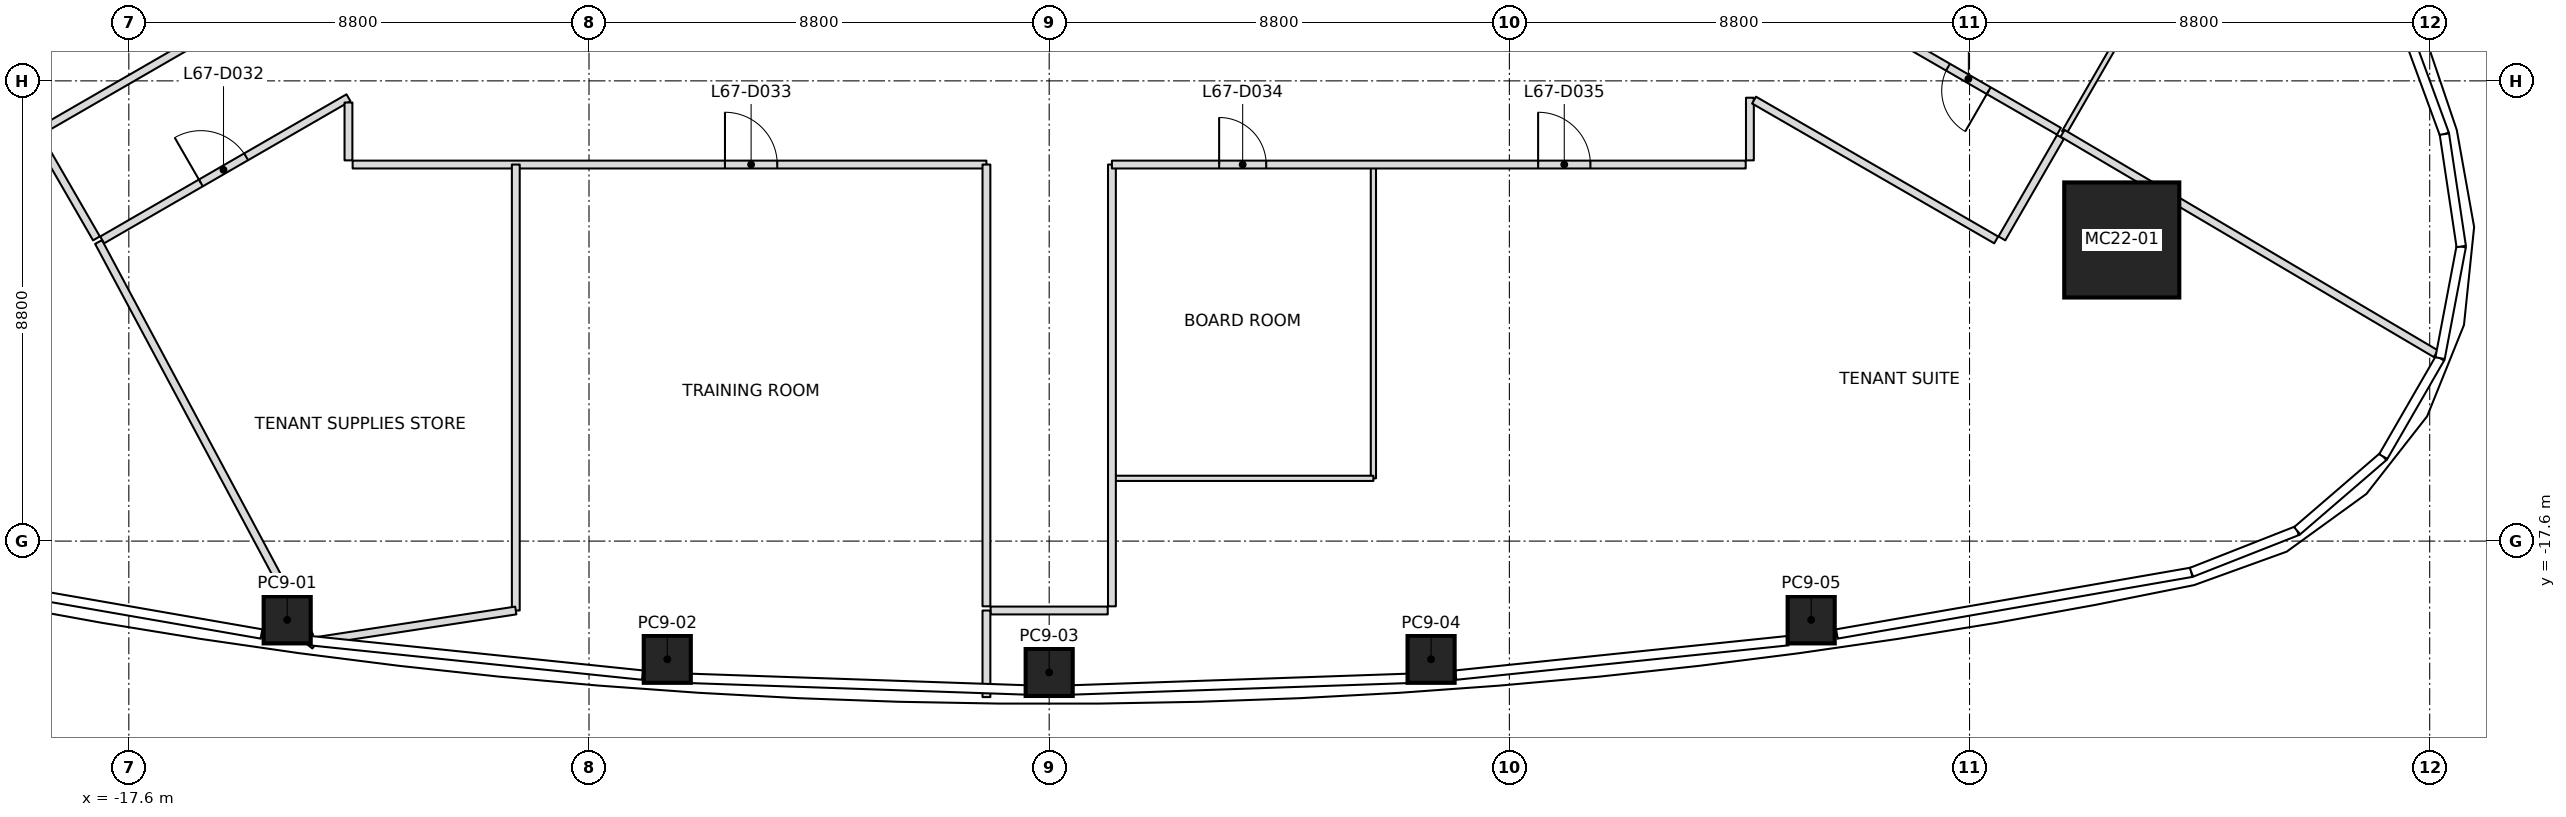
"""IFC4 building model, lengths in metres.
Left out: names, types, materials, properties, quantities, classifications, styles, units other than length and angle.
Written with IfcOpenShell. Run it as: python <this file> out.ifc"""

import sys

from ifc_helpers import new_model, si_unit, direction, frame, frame_2d, origin, origin_2d, place, context, subcontext, project, spatial, rectangle, extrude, element, fill, save


model = new_model("IFC4")
c1 = context("Model", 3, precision=1e-05, world=origin(), true_north=direction((0.0, 1.0)))
c2 = subcontext(c1, "Body", "Model", "MODEL_VIEW")
j1 = project(units=[si_unit("LENGTHUNIT", "METRE"), si_unit("PLANEANGLEUNIT", "RADIAN")], contexts=[c1])
p1 = place(None, origin())
s1 = spatial("IfcSite", under=j1, at=p1, CompositionType="ELEMENT")
p2 = place(p1, origin())
s2 = spatial("IfcBuilding", under=s1, at=p2, CompositionType="ELEMENT")
p3 = place(p2, frame((0.0, 0.0, 295.0)))
s3 = spatial("IfcBuildingStorey", under=s2, at=p3, CompositionType="ELEMENT", Elevation=295.0)
p4 = place(p3, frame((20.511, -11.842, 0.0), z_axis=(-0.027695790401, 0.015983033227, 0.999488612163), x_axis=(0.999616398022, 0.00044283261, 0.027692249912)))
e1 = element("IfcColumn", 1, at=p4, inside=s3, PredefinedType="COLUMN", context=c2, shape_type="SweptSolid", body=[
    extrude(rectangle(XDim=2.2, YDim=2.2, at=origin_2d()), origin(), (0.0, 0.0, 1.0), 4.002),
])
p5 = place(p3, frame((-14.572, -19.106, 0.0), z_axis=(0.017452456582, 0.010373837829, 0.999793876381), x_axis=(-0.990378020891, 0.137476485658, 0.015861640101)))
e2 = element("IfcColumn", 2, at=p5, inside=s3, PredefinedType="COLUMN", context=c2, shape_type="SweptSolid", body=[
    extrude(rectangle(XDim=0.9, YDim=0.9, at=origin_2d()), origin(), (0.0, 0.0, 1.0), 4.001),
])
p6 = place(p3, frame((-7.303, -19.86, 0.0), z_axis=(0.008727150594, 0.011168311599, 0.999899547784), x_axis=(-0.997591359103, 0.068909208886, 0.007937327827)))
e3 = element("IfcColumn", 3, at=p6, inside=s3, PredefinedType="COLUMN", context=c2, shape_type="SweptSolid", body=[
    extrude(rectangle(XDim=0.9, YDim=0.9, at=origin_2d()), origin(), (0.0, 0.0, 1.0), 4.0),
])
p7 = place(p3, frame((0.0, -20.111, 0.0), z_axis=(0.0, 0.01141283087, 0.999934871525), x_axis=(1.0, 0.0, 0.0)))
e4 = element("IfcColumn", 4, at=p7, inside=s3, PredefinedType="COLUMN", context=c2, shape_type="SweptSolid", body=[
    extrude(rectangle(XDim=0.9, YDim=0.9, at=origin_2d()), origin(), (0.0, 0.0, 1.0), 4.0),
])
p8 = place(p3, frame((7.303, -19.86, 0.0), z_axis=(-0.008727150594, 0.011168311599, 0.999899547784), x_axis=(0.997591359103, 0.068909208886, 0.007937327827)))
e5 = element("IfcColumn", 5, at=p8, inside=s3, PredefinedType="COLUMN", context=c2, shape_type="SweptSolid", body=[
    extrude(rectangle(XDim=0.9, YDim=0.9, at=origin_2d()), origin(), (0.0, 0.0, 1.0), 4.0),
])
p9 = place(p3, frame((14.572, -19.106, 0.0), z_axis=(-0.017452456582, 0.010373837829, 0.999793876381), x_axis=(0.990378020891, 0.137476485658, 0.015861640101)))
e6 = element("IfcColumn", 6, at=p9, inside=s3, PredefinedType="COLUMN", context=c2, shape_type="SweptSolid", body=[
    extrude(rectangle(XDim=0.9, YDim=0.9, at=origin_2d()), origin(), (0.0, 0.0, 1.0), 4.001),
])
p10 = place(p3, frame((-18.179, -11.881, 0.0), z_axis=(0.0, 0.0, 1.0), x_axis=(0.471890219443, -0.881657314831, 0.0)))
e7 = element("IfcWall", 7, at=p10, inside=s3, PredefinedType="PARTITIONING", context=c2, shape_type="SweptSolid", body=[
    extrude(rectangle(XDim=8.552, YDim=0.15, at=frame_2d((4.276, 0.0))), origin(), (0.0, 0.0, 1.0), 3.45),
])
p11 = place(p3, frame((-10.2, -10.4, 0.0), z_axis=(0.0, 0.0, 1.0), x_axis=(0.0, -1.0, 0.0)))
e8 = element("IfcWall", 8, at=p11, inside=s3, PredefinedType="PARTITIONING", context=c2, shape_type="SweptSolid", body=[
    extrude(rectangle(XDim=8.527, YDim=0.15, at=frame_2d((4.264, 0.0))), origin(), (0.0, 0.0, 1.0), 3.45),
])
p12 = place(p3, frame((-10.2, -18.927, 0.0), z_axis=(0.0, 0.0, 1.0), x_axis=(-0.988493450788, -0.151263669625, 0.0)))
e9 = element("IfcWall", 9, at=p12, inside=s3, PredefinedType="PARTITIONING", context=c2, shape_type="SweptSolid", body=[
    extrude(rectangle(XDim=3.838, YDim=0.15, at=frame_2d((1.919, 0.0))), origin(), (0.0, 0.0, 1.0), 3.234),
])
p13 = place(p3, frame((-14.044, -19.594, 0.0), z_axis=(0.0, 0.0, 1.0), x_axis=(-0.785084693937, 0.619388426875, 0.0)))
e10 = element("IfcWall", 10, at=p13, inside=s3, PredefinedType="PARTITIONING", context=c2, shape_type="SweptSolid", body=[
    extrude(rectangle(XDim=0.186, YDim=0.15, at=frame_2d((0.093, 0.0))), origin(), (0.0, 0.0, 1.0), 3.45),
])
p14 = place(p3, frame((-1.2, -18.927, 0.0), z_axis=(0.0, 0.0, 1.0), x_axis=(0.0, -1.0, 0.0)))
e11 = element("IfcWall", 11, at=p14, inside=s3, PredefinedType="PARTITIONING", context=c2, shape_type="SweptSolid", body=[
    extrude(rectangle(XDim=1.656, YDim=0.15, at=frame_2d((0.828, 0.0))), origin(), (0.0, 0.0, 1.0), 3.234),
])
p15 = place(p3, frame((19.379, -9.803, 0.0), z_axis=(0.0, 0.0, 1.0), x_axis=(0.861122287614, -0.508397881364, 0.0)))
e12 = element("IfcWall", 12, at=p15, inside=s3, PredefinedType="PARTITIONING", context=c2, shape_type="SweptSolid", body=[
    extrude(rectangle(XDim=8.29, YDim=0.15, at=frame_2d((4.145, 0.0))), origin(), (0.0, 0.0, 1.0), 3.234),
])
p16 = place(p3, frame((-19.339, -9.872, 0.0), z_axis=(0.0, 0.0, 1.0), x_axis=(0.500030632641, -0.866007717299, 0.0)))
e13 = element("IfcWall", 13, at=p16, inside=s3, PredefinedType="PARTITIONING", context=c2, shape_type="SweptSolid", body=[
    extrude(rectangle(XDim=2.24, YDim=0.15, at=frame_2d((1.12, 0.0))), origin(), (0.0, 0.0, 1.0), 3.233),
])
p17 = place(p3, frame((-13.4, -6.351, 0.0), z_axis=(0.0, 0.0, 1.0), x_axis=(-0.866024132967, -0.500002201113, 0.0)))
e14 = element("IfcWall", 14, at=p17, inside=s3, PredefinedType="PARTITIONING", context=c2, shape_type="SweptSolid", body=[
    extrude(rectangle(XDim=6.824, YDim=0.15, at=frame_2d((3.412, 0.0))), origin(), (0.0, 0.0, 1.0), 3.317),
])
p18 = place(p3, frame((-18.11, -11.841, 0.0), z_axis=(0.0, 0.0, 1.0), x_axis=(0.866030095999, 0.499991872758, 0.0)))
e15 = element("IfcWall", 15, at=p18, inside=s3, PredefinedType="PARTITIONING", context=c2, shape_type="SweptSolid", body=[
    extrude(rectangle(XDim=5.438, YDim=0.15, at=frame_2d((2.719, 0.0))), origin(), (0.0, 0.0, 1.0), 3.233),
])
p19 = place(p18, frame((2.179, 0.0, 0.0)))
e16 = element("IfcOpeningElement", 16, at=p19, cuts=e15, PredefinedType="OPENING", context=c2, shape_type="SweptSolid", body=[
    extrude(rectangle(XDim=1.0, YDim=2.1, at=frame_2d((0.5, 1.05))), frame((0.0, 0.075, 0.0), z_axis=(0.0, -1.0, 0.0), x_axis=(1.0, 0.0, 0.0)), (0.0, 0.0, 1.0), 0.15),
])
p20 = place(p3, frame((-13.4, -9.214, 0.0), z_axis=(0.0, 0.0, 1.0), x_axis=(0.0, -1.0, 0.0)))
e17 = element("IfcWall", 17, at=p20, inside=s3, PredefinedType="PARTITIONING", context=c2, shape_type="SweptSolid", body=[
    extrude(rectangle(XDim=1.106, YDim=0.15, at=frame_2d((0.553, 0.0))), origin(), (0.0, 0.0, 1.0), 3.233),
])
p21 = place(p3, frame((-13.32, -10.4, 0.0), z_axis=(0.0, 0.0, 1.0), x_axis=(1.0, 0.0, 0.0)))
e18 = element("IfcWall", 18, at=p21, inside=s3, PredefinedType="PARTITIONING", context=c2, shape_type="SweptSolid", body=[
    extrude(rectangle(XDim=12.12, YDim=0.15, at=frame_2d((6.06, 0.0))), origin(), (0.0, 0.0, 1.0), 3.393),
])
p22 = place(p21, frame((7.12, 0.0, 0.0)))
e19 = element("IfcOpeningElement", 19, at=p22, cuts=e18, PredefinedType="OPENING", context=c2, shape_type="SweptSolid", body=[
    extrude(rectangle(XDim=1.0, YDim=2.1, at=frame_2d((0.5, 1.05))), frame((0.0, 0.075, 0.0), z_axis=(0.0, -1.0, 0.0), x_axis=(1.0, 0.0, 0.0)), (0.0, 0.0, 1.0), 0.15),
])
p23 = place(p3, frame((-1.2, -10.4, 0.0), z_axis=(0.0, 0.0, 1.0), x_axis=(0.0, -1.0, 0.0)))
e20 = element("IfcWall", 20, at=p23, inside=s3, PredefinedType="PARTITIONING", context=c2, shape_type="SweptSolid", body=[
    extrude(rectangle(XDim=8.447, YDim=0.15, at=frame_2d((4.224, 0.0))), origin(), (0.0, 0.0, 1.0), 3.45),
])
p24 = place(p3, frame((-1.12, -18.927, 0.0), z_axis=(0.0, 0.0, 1.0), x_axis=(1.0, 0.0, 0.0)))
e21 = element("IfcWall", 21, at=p24, inside=s3, PredefinedType="PARTITIONING", context=c2, shape_type="SweptSolid", body=[
    extrude(rectangle(XDim=2.24, YDim=0.15, at=frame_2d((1.12, 0.0))), origin(), (0.0, 0.0, 1.0), 3.45),
])
p25 = place(p3, frame((1.2, -18.847, 0.0), z_axis=(0.0, 0.0, 1.0), x_axis=(0.0, 1.0, 0.0)))
e22 = element("IfcWall", 22, at=p25, inside=s3, PredefinedType="PARTITIONING", context=c2, shape_type="SweptSolid", body=[
    extrude(rectangle(XDim=8.447, YDim=0.15, at=frame_2d((4.224, 0.0))), origin(), (0.0, 0.0, 1.0), 3.45),
])
p26 = place(p3, frame((1.2, -10.4, 0.0), z_axis=(0.0, 0.0, 1.0), x_axis=(1.0, 0.0, 0.0)))
e23 = element("IfcWall", 23, at=p26, inside=s3, PredefinedType="PARTITIONING", context=c2, shape_type="SweptSolid", body=[
    extrude(rectangle(XDim=12.12, YDim=0.15, at=frame_2d((6.06, 0.0))), origin(), (0.0, 0.0, 1.0), 3.393),
])
p27 = place(p26, frame((2.05, 0.0, 0.0)))
e24 = element("IfcOpeningElement", 24, at=p27, cuts=e23, PredefinedType="OPENING", context=c2, shape_type="SweptSolid", body=[
    extrude(rectangle(XDim=0.9, YDim=2.1, at=frame_2d((0.45, 1.05))), frame((0.0, 0.075, 0.0), z_axis=(0.0, -1.0, 0.0), x_axis=(1.0, 0.0, 0.0)), (0.0, 0.0, 1.0), 0.15),
])
p28 = place(p26, frame((8.15, 0.0, 0.0)))
e25 = element("IfcOpeningElement", 25, at=p28, cuts=e23, PredefinedType="OPENING", context=c2, shape_type="SweptSolid", body=[
    extrude(rectangle(XDim=1.0, YDim=2.1, at=frame_2d((0.5, 1.05))), frame((0.0, 0.075, 0.0), z_axis=(0.0, -1.0, 0.0), x_axis=(1.0, 0.0, 0.0)), (0.0, 0.0, 1.0), 0.15),
])
p29 = place(p3, frame((13.4, -10.32, 0.0), z_axis=(0.0, 0.0, 1.0), x_axis=(0.0, 1.0, 0.0)))
e26 = element("IfcWall", 26, at=p29, inside=s3, PredefinedType="PARTITIONING", context=c2, shape_type="SweptSolid", body=[
    extrude(rectangle(XDim=1.198, YDim=0.15, at=frame_2d((0.599, 0.0))), origin(), (0.0, 0.0, 1.0), 3.233),
])
p30 = place(p3, frame((13.479, -9.168, 0.0), z_axis=(0.0, 0.0, 1.0), x_axis=(0.866037316941, -0.49997936524, 0.0)))
e27 = element("IfcWall", 27, at=p30, inside=s3, PredefinedType="PARTITIONING", context=c2, shape_type="SweptSolid", body=[
    extrude(rectangle(XDim=5.347, YDim=0.15, at=frame_2d((2.673, 0.0))), origin(), (0.0, 0.0, 1.0), 3.233),
])
p31 = place(p3, frame((19.31, -9.763, 0.0), z_axis=(0.0, 0.0, 1.0), x_axis=(-0.866024132967, 0.500002201113, 0.0)))
e28 = element("IfcWall", 28, at=p31, inside=s3, PredefinedType="PARTITIONING", context=c2, shape_type="SweptSolid", body=[
    extrude(rectangle(XDim=6.824, YDim=0.15, at=frame_2d((3.412, 0.0))), origin(), (0.0, 0.0, 1.0), 3.317),
])
p32 = place(p31, frame((1.55, 0.0, 0.0)))
e29 = element("IfcOpeningElement", 29, at=p32, cuts=e28, PredefinedType="OPENING", context=c2, shape_type="SweptSolid", body=[
    extrude(rectangle(XDim=0.9, YDim=2.1, at=frame_2d((0.45, 1.05))), frame((0.0, 0.075, 0.0), z_axis=(0.0, -1.0, 0.0), x_axis=(1.0, 0.0, 0.0)), (0.0, 0.0, 1.0), 0.15),
])
p33 = place(p31, frame((5.012, 0.0, 0.0)))
e30 = element("IfcOpeningElement", 30, at=p33, cuts=e28, PredefinedType="OPENING", context=c2, shape_type="SweptSolid", body=[
    extrude(rectangle(XDim=1.0, YDim=2.1, at=frame_2d((0.5, 1.05))), frame((0.0, 0.075, 0.0), z_axis=(0.0, -1.0, 0.0), x_axis=(1.0, 0.0, 0.0)), (0.0, 0.0, 1.0), 0.15),
])
p34 = place(p3, frame((18.219, -11.812, 0.0), z_axis=(0.0, 0.0, 1.0), x_axis=(0.500030632641, 0.866007717299, 0.0)))
e31 = element("IfcWall", 31, at=p34, inside=s3, PredefinedType="PARTITIONING", context=c2, shape_type="SweptSolid", body=[
    extrude(rectangle(XDim=2.24, YDim=0.15, at=frame_2d((1.12, 0.0))), origin(), (0.0, 0.0, 1.0), 3.233),
])
p35 = place(p3, frame((6.2, -10.43, 0.0), z_axis=(0.0, 0.0, 1.0), x_axis=(0.0, -1.0, 0.0)))
e32 = element("IfcWall", 32, at=p35, inside=s3, PredefinedType="PARTITIONING", context=c2, shape_type="SweptSolid", body=[
    extrude(rectangle(XDim=5.97, YDim=0.1, at=frame_2d((2.985, 0.0))), origin(), (0.0, 0.0, 1.0), 3.45),
])
p36 = place(p3, frame((6.2, -16.4, 0.0), z_axis=(0.0, 0.0, 1.0), x_axis=(-1.0, 0.0, 0.0)))
e33 = element("IfcWall", 33, at=p36, inside=s3, PredefinedType="PARTITIONING", context=c2, shape_type="SweptSolid", body=[
    extrude(rectangle(XDim=4.97, YDim=0.1, at=frame_2d((2.485, 0.0))), origin(), (0.0, 0.0, 1.0), 3.393),
])
p37 = place(p3, frame((21.896, -5.483, 0.0), z_axis=(0.0, 0.0, 1.0), x_axis=(-0.500011595943, -0.86601870876, 0.0)))
e34 = element("IfcWall", 34, at=p37, inside=s3, PredefinedType="PARTITIONING", context=c2, shape_type="SweptSolid", body=[
    extrude(rectangle(XDim=4.97, YDim=0.1, at=frame_2d((2.485, 0.0))), origin(), (0.0, 0.0, 1.0), 3.443),
])
p38 = place(p19, origin())
e35 = element("IfcDoor", 35, at=p38, inside=s3, OperationType="SINGLE_SWING_LEFT", PredefinedType="DOOR", context=c2, shape_type="SweptSolid", body=[
    extrude(rectangle(XDim=1.0, YDim=2.1, at=frame_2d((0.5, 1.05))), frame((0.0, 0.025, 0.0), z_axis=(0.0, -1.0, 0.0), x_axis=(1.0, 0.0, 0.0)), (0.0, 0.0, 1.0), 0.05),
])
fill(e16, e35)
p39 = place(p22, origin())
e36 = element("IfcDoor", 36, at=p39, inside=s3, OperationType="SINGLE_SWING_LEFT", PredefinedType="DOOR", context=c2, shape_type="SweptSolid", body=[
    extrude(rectangle(XDim=1.0, YDim=2.1, at=frame_2d((0.5, 1.05))), frame((0.0, 0.025, 0.0), z_axis=(0.0, -1.0, 0.0), x_axis=(1.0, 0.0, 0.0)), (0.0, 0.0, 1.0), 0.05),
])
fill(e19, e36)
p40 = place(p27, origin())
e37 = element("IfcDoor", 37, at=p40, inside=s3, OperationType="SINGLE_SWING_RIGHT", PredefinedType="DOOR", context=c2, shape_type="SweptSolid", body=[
    extrude(rectangle(XDim=0.9, YDim=2.1, at=frame_2d((0.45, 1.05))), frame((0.0, 0.025, 0.0), z_axis=(0.0, -1.0, 0.0), x_axis=(1.0, 0.0, 0.0)), (0.0, 0.0, 1.0), 0.05),
])
fill(e24, e37)
p41 = place(p28, origin())
e38 = element("IfcDoor", 38, at=p41, inside=s3, OperationType="SINGLE_SWING_LEFT", PredefinedType="DOOR", context=c2, shape_type="SweptSolid", body=[
    extrude(rectangle(XDim=1.0, YDim=2.1, at=frame_2d((0.5, 1.05))), frame((0.0, 0.025, 0.0), z_axis=(0.0, -1.0, 0.0), x_axis=(1.0, 0.0, 0.0)), (0.0, 0.0, 1.0), 0.05),
])
fill(e25, e38)
p42 = place(p32, origin())
e39 = element("IfcDoor", 39, at=p42, inside=s3, OperationType="SINGLE_SWING_RIGHT", PredefinedType="DOOR", context=c2, shape_type="SweptSolid", body=[
    extrude(rectangle(XDim=0.9, YDim=2.1, at=frame_2d((0.45, 1.05))), frame((0.0, 0.025, 0.0), z_axis=(0.0, -1.0, 0.0), x_axis=(1.0, 0.0, 0.0)), (0.0, 0.0, 1.0), 0.05),
])
fill(e29, e39)
save(model, sys.argv[1])
